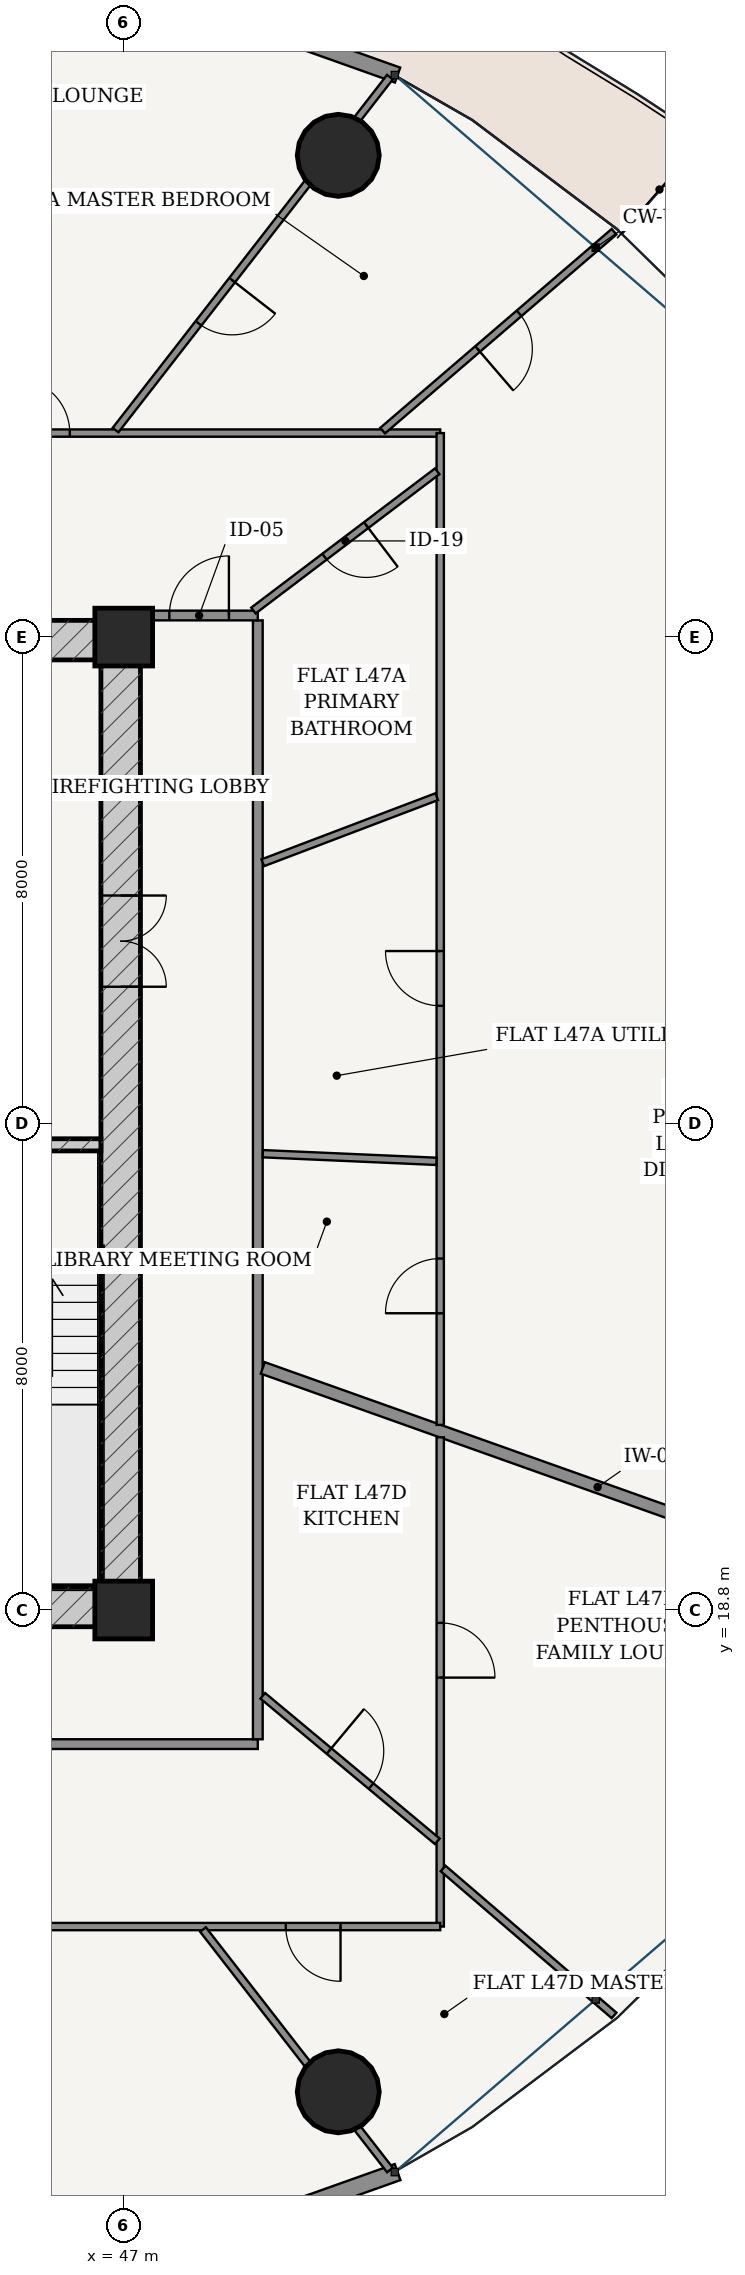
"""IFC4 building model, lengths in metres.
Left out: names, types, materials, properties, quantities, classifications, styles, units other than length and angle.
Written with IfcOpenShell. Run it as: python <this file> out.ifc"""

import sys

from ifc_helpers import new_model, si_unit, direction, frame, frame_2d, origin, origin_2d, place, context, subcontext, project, spatial, rectangle, hollow_circle, extrude, source, transform, mapped, element, fill, save


model = new_model("IFC4")
c1 = context("Model", 3, precision=1e-05, world=origin(), true_north=direction((-0.2419218956, 0.970295726276)))
c2 = subcontext(c1, "Body", "Model", "MODEL_VIEW")
j1 = project(units=[si_unit("LENGTHUNIT", "METRE"), si_unit("PLANEANGLEUNIT", "RADIAN")], contexts=[c1])
p1 = place(None, origin())
s1 = spatial("IfcSite", under=j1, at=p1, CompositionType="ELEMENT")
p2 = place(p1, origin())
s2 = spatial("IfcBuilding", under=s1, at=p2, CompositionType="ELEMENT")
p3 = place(p2, frame((0.0, 0.0, 178.6)))
s3 = spatial("IfcBuildingStorey", under=s2, at=p3, CompositionType="ELEMENT", Elevation=178.6)
for number, where, z_axis, x_axis in (
    (1, (47.0, 18.8, 0.0), (0.0, 0.0, 1.0), (1.0, 0.0, 0.0)),
    (2, (47.0, 34.8, 0.0), (0.0, 0.0, 1.0), (1.0, 0.0, 0.0)),
):
    element("IfcColumn", number, at=place(p3, frame(where, z_axis=z_axis, x_axis=x_axis)), inside=s3, PredefinedType="COLUMN", context=c2, shape_type="SweptSolid", body=[
        extrude(rectangle(XDim=0.95, YDim=0.95, at=origin_2d()), origin(), (0.0, 0.0, 1.0), 3.6),
    ])
p4 = place(p3, frame((28.725, 18.85, 0.0), z_axis=(0.0, 0.0, 1.0), x_axis=(1.0, 0.0, 0.0)))
e3 = element("IfcWall", 3, at=p4, inside=s3, PredefinedType="SHEAR", context=c2, shape_type="SweptSolid", body=[
    extrude(rectangle(XDim=18.55, YDim=0.65, at=frame_2d((9.275, 0.0))), origin(), (0.0, 0.0, 1.0), 3.33),
])
p5 = place(p4, frame((7.51, 0.0, 0.0)))
e4 = element("IfcOpeningElement", 4, at=p5, cuts=e3, PredefinedType="OPENING", context=c2, shape_type="SweptSolid", body=[
    extrude(rectangle(XDim=0.85, YDim=2.1, at=frame_2d((0.425, 1.05))), frame((0.0, 0.335, 0.0), z_axis=(0.0, -1.0, 0.0), x_axis=(1.0, 0.0, 0.0)), (0.0, 0.0, 1.0), 0.67),
])
p6 = place(p4, frame((10.59, 0.0, 0.0)))
e5 = element("IfcOpeningElement", 5, at=p6, cuts=e3, PredefinedType="OPENING", context=c2, shape_type="SweptSolid", body=[
    extrude(rectangle(XDim=0.85, YDim=2.1, at=frame_2d((0.425, 1.05))), frame((0.0, 0.335, 0.0), z_axis=(0.0, -1.0, 0.0), x_axis=(1.0, 0.0, 0.0)), (0.0, 0.0, 1.0), 0.67),
])
p7 = place(p3, frame((28.725, 34.75, 0.0), z_axis=(0.0, 0.0, 1.0), x_axis=(1.0, 0.0, 0.0)))
e6 = element("IfcWall", 6, at=p7, inside=s3, PredefinedType="SHEAR", context=c2, shape_type="SweptSolid", body=[
    extrude(rectangle(XDim=18.55, YDim=0.65, at=frame_2d((9.275, 0.0))), origin(), (0.0, 0.0, 1.0), 3.33),
])
p8 = place(p3, frame((46.95, 19.175, 0.0), z_axis=(0.0, 0.0, 1.0), x_axis=(0.0, 1.0, 0.0)))
e7 = element("IfcWall", 7, at=p8, inside=s3, PredefinedType="SHEAR", context=c2, shape_type="SweptSolid", body=[
    extrude(rectangle(XDim=15.25, YDim=0.65, at=frame_2d((7.625, 0.0))), origin(), (0.0, 0.0, 1.0), 3.33),
])
p9 = place(p8, frame((9.875, 0.0, 0.0)))
e8 = element("IfcOpeningElement", 8, at=p9, cuts=e7, PredefinedType="OPENING", context=c2, shape_type="SweptSolid", body=[
    extrude(rectangle(XDim=1.5, YDim=2.2, at=frame_2d((0.75, 1.1))), frame((0.0, 0.335, 0.0), z_axis=(0.0, -1.0, 0.0), x_axis=(1.0, 0.0, 0.0)), (0.0, 0.0, 1.0), 0.67),
])
p10 = place(p3, frame((43.305, 26.45, 0.0), z_axis=(0.0, 0.0, 1.0), x_axis=(1.0, 0.0, 0.0)))
e9 = element("IfcWall", 9, at=p10, inside=s3, PredefinedType="SOLIDWALL", context=c2, shape_type="SweptSolid", body=[
    extrude(rectangle(XDim=3.32, YDim=0.2, at=frame_2d((1.66, 0.0))), origin(), (0.0, 0.0, 1.0), 3.33),
])
p11 = place(p10, frame((1.185, 0.0, 0.0)))
e10 = element("IfcOpeningElement", 10, at=p11, cuts=e9, PredefinedType="OPENING", context=c2, shape_type="SweptSolid", body=[
    extrude(rectangle(XDim=0.95, YDim=2.15, at=frame_2d((0.475, 1.075))), frame((0.0, 0.11, 0.0), z_axis=(0.0, -1.0, 0.0), x_axis=(1.0, 0.0, 0.0)), (0.0, 0.0, 1.0), 0.22),
])
for number, where, z_axis, x_axis in (
    (11, (50.528, 42.723, 0.0), (0.0, 0.0, 1.0), (1.0, 0.0, 0.0)),
    (12, (50.528, 10.877, 0.0), (0.0, 0.0, 1.0), (1.0, 0.0, 0.0)),
):
    element("IfcColumn", number, at=place(p3, frame(where, z_axis=z_axis, x_axis=x_axis)), inside=s3, PredefinedType="COLUMN", context=c2, shape_type="SweptSolid", body=[
        extrude(hollow_circle(Radius=0.675, WallThickness=0.042, at=origin_2d()), origin(), (0.0, 0.0, 1.0), 3.6),
    ])
p12 = place(p3, frame((51.503, 44.043, 0.0), z_axis=(0.0, 0.0, 1.0), x_axis=(-0.942095406405, 0.335344964522, 0.0)))
e13 = element("IfcWall", 13, at=p12, inside=s3, PredefinedType="SOLIDWALL", context=c2, shape_type="SweptSolid", body=[
    extrude(rectangle(XDim=9.408, YDim=0.26, at=frame_2d((4.704, 0.0))), origin(), (0.0, 0.0, 1.0), 3.33),
])
p13 = place(p12, frame((4.029, 0.0, 0.0)))
e14 = element("IfcOpeningElement", 14, at=p13, cuts=e13, PredefinedType="OPENING", context=c2, shape_type="SweptSolid", body=[
    extrude(rectangle(XDim=1.35, YDim=2.2, at=frame_2d((0.675, 1.1))), frame((0.0, 0.14, 0.0), z_axis=(0.0, -1.0, 0.0), x_axis=(1.0, 0.0, 0.0)), (0.0, 0.0, 1.0), 0.28),
])
p14 = place(p3, frame((42.64, 6.402, 0.0), z_axis=(0.0, 0.0, 1.0), x_axis=(0.942103604331, 0.335321932934, 0.0)))
e15 = element("IfcWall", 15, at=p14, inside=s3, PredefinedType="SOLIDWALL", context=c2, shape_type="SweptSolid", body=[
    extrude(rectangle(XDim=9.408, YDim=0.28, at=frame_2d((4.704, 0.0))), origin(), (0.0, 0.0, 1.0), 3.33),
])
p15 = place(p14, frame((1.49, 0.0, 0.85)))
e16 = element("IfcOpeningElement", 16, at=p15, cuts=e15, PredefinedType="OPENING", context=c2, shape_type="SweptSolid", body=[
    extrude(rectangle(XDim=2.1, YDim=1.95, at=frame_2d((1.05, 0.975))), frame((0.0, 0.15, 0.0), z_axis=(0.0, -1.0, 0.0), x_axis=(1.0, 0.0, 0.0)), (0.0, 0.0, 1.0), 0.3),
])
p16 = place(p14, frame((5.818, 0.0, 0.85)))
e17 = element("IfcOpeningElement", 17, at=p16, cuts=e15, PredefinedType="OPENING", context=c2, shape_type="SweptSolid", body=[
    extrude(rectangle(XDim=2.1, YDim=1.95, at=frame_2d((1.05, 0.975))), frame((0.0, 0.15, 0.0), z_axis=(0.0, -1.0, 0.0), x_axis=(1.0, 0.0, 0.0)), (0.0, 0.0, 1.0), 0.3),
])
p17 = place(p3, frame((34.32, 16.595, 0.0), z_axis=(0.0, 0.0, 1.0), x_axis=(1.0, 0.0, 0.0)))
e18 = element("IfcWall", 18, at=p17, inside=s3, PredefinedType="PARTITIONING", context=c2, shape_type="SweptSolid", body=[
    extrude(rectangle(XDim=14.885, YDim=0.16, at=frame_2d((7.442, 0.0))), origin(), (0.0, 0.0, 1.0), 2.776),
])
p18 = place(p17, frame((10.026, 0.0, 0.0)))
e19 = element("IfcOpeningElement", 19, at=p18, cuts=e18, PredefinedType="OPENING", context=c2, shape_type="SweptSolid", body=[
    extrude(rectangle(XDim=0.98, YDim=2.2, at=frame_2d((0.49, 1.1))), frame((0.0, 0.09, 0.0), z_axis=(0.0, -1.0, 0.0), x_axis=(1.0, 0.0, 0.0)), (0.0, 0.0, 1.0), 0.18),
])
p19 = place(p3, frame((49.205, 16.675, 0.0), z_axis=(0.0, 0.0, 1.0), x_axis=(0.0, 1.0, 0.0)))
e20 = element("IfcWall", 20, at=p19, inside=s3, PredefinedType="PARTITIONING", context=c2, shape_type="SweptSolid", body=[
    extrude(rectangle(XDim=18.4, YDim=0.16, at=frame_2d((9.2, 0.0))), origin(), (0.0, 0.0, 1.0), 2.776),
])
p20 = place(p3, frame((47.275, 35.155, 0.0), z_axis=(0.0, 0.0, 1.0), x_axis=(1.0, 0.0, 0.0)))
e21 = element("IfcWall", 21, at=p20, inside=s3, PredefinedType="PARTITIONING", context=c2, shape_type="SweptSolid", body=[
    extrude(rectangle(XDim=1.93, YDim=0.16, at=frame_2d((0.965, 0.0))), origin(), (0.0, 0.0, 1.0), 2.776),
])
p21 = place(p20, frame((0.475, 0.0, 0.0)))
e22 = element("IfcOpeningElement", 22, at=p21, cuts=e21, PredefinedType="OPENING", context=c2, shape_type="SweptSolid", body=[
    extrude(rectangle(XDim=0.98, YDim=2.2, at=frame_2d((0.49, 1.1))), frame((0.0, 0.09, 0.0), z_axis=(0.0, -1.0, 0.0), x_axis=(1.0, 0.0, 0.0)), (0.0, 0.0, 1.0), 0.18),
])
p22 = place(p3, frame((49.287, 22.782, 0.0), z_axis=(0.0, 0.0, 1.0), x_axis=(0.942076460895, -0.335398183996, 0.0)))
e23 = element("IfcWall", 23, at=p22, inside=s3, PredefinedType="PARTITIONING", context=c2, shape_type="SweptSolid", body=[
    extrude(rectangle(XDim=11.689, YDim=0.2, at=frame_2d((5.845, 0.0))), origin(), (0.0, 0.0, 1.0), 2.846),
])
p23 = place(p3, frame((44.195, 38.155, 0.0), z_axis=(0.0, 0.0, 1.0), x_axis=(1.0, 0.0, 0.0)))
e24 = element("IfcWall", 24, at=p23, inside=s3, PredefinedType="PARTITIONING", context=c2, shape_type="SweptSolid", body=[
    extrude(rectangle(XDim=8.01, YDim=0.12, at=frame_2d((4.005, 0.0))), origin(), (0.0, 0.0, 1.0), 2.776),
])
p24 = place(p23, frame((1.018, 0.0, 0.0)))
e25 = element("IfcOpeningElement", 25, at=p24, cuts=e24, PredefinedType="OPENING", context=c2, shape_type="SweptSolid", body=[
    extrude(rectangle(XDim=0.9, YDim=2.15, at=frame_2d((0.45, 1.075))), frame((0.0, 0.07, 0.0), z_axis=(0.0, -1.0, 0.0), x_axis=(1.0, 0.0, 0.0)), (0.0, 0.0, 1.0), 0.14),
])
p25 = place(p3, frame((52.205, 38.155, 0.0), z_axis=(0.0, 0.0, 1.0), x_axis=(0.0, -1.0, 0.0)))
e26 = element("IfcWall", 26, at=p25, inside=s3, PredefinedType="PARTITIONING", context=c2, shape_type="SweptSolid", body=[
    extrude(rectangle(XDim=16.31, YDim=0.12, at=frame_2d((8.155, 0.0))), origin(), (0.0, 0.0, 1.0), 2.776),
])
p26 = place(p25, frame((13.574, 0.0, 0.0)))
e27 = element("IfcOpeningElement", 27, at=p26, cuts=e26, PredefinedType="OPENING", context=c2, shape_type="SweptSolid", body=[
    extrude(rectangle(XDim=0.9, YDim=2.15, at=frame_2d((0.45, 1.075))), frame((0.0, 0.07, 0.0), z_axis=(0.0, -1.0, 0.0), x_axis=(1.0, 0.0, 0.0)), (0.0, 0.0, 1.0), 0.14),
])
p27 = place(p25, frame((8.518, 0.0, 0.0)))
e28 = element("IfcOpeningElement", 28, at=p27, cuts=e26, PredefinedType="OPENING", context=c2, shape_type="SweptSolid", body=[
    extrude(rectangle(XDim=0.9, YDim=2.15, at=frame_2d((0.45, 1.075))), frame((0.0, 0.07, 0.0), z_axis=(0.0, -1.0, 0.0), x_axis=(1.0, 0.0, 0.0)), (0.0, 0.0, 1.0), 0.14),
])
p28 = place(p3, frame((51.258, 38.195, 0.0), z_axis=(0.0, 0.0, 1.0), x_axis=(0.758369880373, 0.651824458381, 0.0)))
e29 = element("IfcWall", 29, at=p28, inside=s3, PredefinedType="PARTITIONING", context=c2, shape_type="SweptSolid", body=[
    extrude(rectangle(XDim=5.018, YDim=0.12, at=frame_2d((2.509, 0.0))), origin(), (0.0, 0.0, 1.0), 2.846),
])
p29 = place(p28, frame((2.059, 0.0, 0.0)))
e30 = element("IfcOpeningElement", 30, at=p29, cuts=e29, PredefinedType="OPENING", context=c2, shape_type="SweptSolid", body=[
    extrude(rectangle(XDim=0.9, YDim=2.15, at=frame_2d((0.45, 1.075))), frame((0.0, 0.07, 0.0), z_axis=(0.0, -1.0, 0.0), x_axis=(1.0, 0.0, 0.0)), (0.0, 0.0, 1.0), 0.14),
])
p30 = place(p3, frame((46.865, 38.204, 0.0), z_axis=(0.0, 0.0, 1.0), x_axis=(0.613754405153, 0.789497010859, 0.0)))
e31 = element("IfcWall", 31, at=p30, inside=s3, PredefinedType="PARTITIONING", context=c2, shape_type="SweptSolid", body=[
    extrude(rectangle(XDim=7.353, YDim=0.12, at=frame_2d((3.677, 0.0))), origin(), (0.0, 0.0, 1.0), 2.776),
])
p31 = place(p30, frame((2.224, 0.0, 0.0)))
e32 = element("IfcOpeningElement", 32, at=p31, cuts=e31, PredefinedType="OPENING", context=c2, shape_type="SweptSolid", body=[
    extrude(rectangle(XDim=0.9, YDim=2.15, at=frame_2d((0.45, 1.075))), frame((0.0, 0.07, 0.0), z_axis=(0.0, -1.0, 0.0), x_axis=(1.0, 0.0, 0.0)), (0.0, 0.0, 1.0), 0.14),
])
p32 = place(p3, frame((49.287, 26.304, 0.0), z_axis=(0.0, 0.0, 1.0), x_axis=(0.999039813392, -0.043811542509, 0.0)))
e33 = element("IfcWall", 33, at=p32, inside=s3, PredefinedType="PARTITIONING", context=c2, shape_type="SweptSolid", body=[
    extrude(rectangle(XDim=2.859, YDim=0.12, at=frame_2d((1.429, 0.0))), origin(), (0.0, 0.0, 1.0), 3.33),
])
p33 = place(p3, frame((49.287, 31.089, 0.0), z_axis=(0.0, 0.0, 1.0), x_axis=(0.934802126635, 0.3551689514, 0.0)))
e34 = element("IfcWall", 34, at=p33, inside=s3, PredefinedType="PARTITIONING", context=c2, shape_type="SweptSolid", body=[
    extrude(rectangle(XDim=3.06, YDim=0.12, at=frame_2d((1.53, 0.0))), origin(), (0.0, 0.0, 1.0), 3.33),
])
p34 = place(p3, frame((49.133, 35.236, 0.0), z_axis=(0.0, 0.0, 1.0), x_axis=(0.797054583929, 0.603907269568, 0.0)))
e35 = element("IfcWall", 35, at=p34, inside=s3, PredefinedType="PARTITIONING", context=c2, shape_type="SweptSolid", body=[
    extrude(rectangle(XDim=3.792, YDim=0.12, at=frame_2d((1.896, 0.0))), origin(), (0.0, 0.0, 1.0), 3.005),
])
p35 = place(p34, frame((1.466, 0.0, 0.0)))
e36 = element("IfcOpeningElement", 36, at=p35, cuts=e35, PredefinedType="OPENING", context=c2, shape_type="SweptSolid", body=[
    extrude(rectangle(XDim=0.86, YDim=2.15, at=frame_2d((0.43, 1.075))), frame((0.0, 0.07, 0.0), z_axis=(0.0, -1.0, 0.0), x_axis=(1.0, 0.0, 0.0)), (0.0, 0.0, 1.0), 0.14),
])
p36 = place(p3, frame((52.205, 21.641, 0.0), z_axis=(0.0, 0.0, 1.0), x_axis=(0.0, -1.0, 0.0)))
e37 = element("IfcWall", 37, at=p36, inside=s3, PredefinedType="PARTITIONING", context=c2, shape_type="SweptSolid", body=[
    extrude(rectangle(XDim=8.046, YDim=0.12, at=frame_2d((4.023, 0.0))), origin(), (0.0, 0.0, 1.0), 2.776),
])
p37 = place(p36, frame((3.052, 0.0, 0.0)))
e38 = element("IfcOpeningElement", 38, at=p37, cuts=e37, PredefinedType="OPENING", context=c2, shape_type="SweptSolid", body=[
    extrude(rectangle(XDim=0.9, YDim=2.15, at=frame_2d((0.45, 1.075))), frame((0.0, 0.07, 0.0), z_axis=(0.0, -1.0, 0.0), x_axis=(1.0, 0.0, 0.0)), (0.0, 0.0, 1.0), 0.14),
])
p38 = place(p3, frame((52.205, 13.595, 0.0), z_axis=(0.0, 0.0, 1.0), x_axis=(-1.0, 0.0, 0.0)))
e39 = element("IfcWall", 39, at=p38, inside=s3, PredefinedType="PARTITIONING", context=c2, shape_type="SweptSolid", body=[
    extrude(rectangle(XDim=17.159, YDim=0.12, at=frame_2d((8.58, 0.0))), origin(), (0.0, 0.0, 1.0), 2.776),
])
p39 = place(p38, frame((6.879, 0.0, 0.0)))
e40 = element("IfcOpeningElement", 40, at=p39, cuts=e39, PredefinedType="OPENING", context=c2, shape_type="SweptSolid", body=[
    extrude(rectangle(XDim=0.9, YDim=2.15, at=frame_2d((0.45, 1.075))), frame((0.0, 0.07, 0.0), z_axis=(0.0, -1.0, 0.0), x_axis=(1.0, 0.0, 0.0)), (0.0, 0.0, 1.0), 0.14),
])
p40 = place(p38, frame((1.64, 0.0, 0.0)))
e41 = element("IfcOpeningElement", 41, at=p40, cuts=e39, PredefinedType="OPENING", context=c2, shape_type="SweptSolid", body=[
    extrude(rectangle(XDim=0.9, YDim=2.15, at=frame_2d((0.45, 1.075))), frame((0.0, 0.07, 0.0), z_axis=(0.0, -1.0, 0.0), x_axis=(1.0, 0.0, 0.0)), (0.0, 0.0, 1.0), 0.14),
])
p41 = place(p3, frame((48.304, 13.546, 0.0), z_axis=(0.0, 0.0, 1.0), x_axis=(0.613734792328, -0.789512257464, 0.0)))
e42 = element("IfcWall", 42, at=p41, inside=s3, PredefinedType="PARTITIONING", context=c2, shape_type="SweptSolid", body=[
    extrude(rectangle(XDim=5.01, YDim=0.12, at=frame_2d((2.505, 0.0))), origin(), (0.0, 0.0, 1.0), 2.776),
])
p42 = place(p3, frame((52.252, 14.55, 0.0), z_axis=(0.0, 0.0, 1.0), x_axis=(0.758368113794, -0.651826513714, 0.0)))
e43 = element("IfcWall", 43, at=p42, inside=s3, PredefinedType="PARTITIONING", context=c2, shape_type="SweptSolid", body=[
    extrude(rectangle(XDim=3.708, YDim=0.12, at=frame_2d((1.854, 0.0))), origin(), (0.0, 0.0, 1.0), 2.846),
])
p43 = place(p3, frame((49.287, 17.39, 0.0), z_axis=(0.0, 0.0, 1.0), x_axis=(0.768065994597, -0.640370695725, 0.0)))
e44 = element("IfcWall", 44, at=p43, inside=s3, PredefinedType="PARTITIONING", context=c2, shape_type="SweptSolid", body=[
    extrude(rectangle(XDim=3.738, YDim=0.12, at=frame_2d((1.869, 0.0))), origin(), (0.0, 0.0, 1.0), 3.005),
])
p44 = place(p43, frame((1.419, 0.0, 0.0)))
e45 = element("IfcOpeningElement", 45, at=p44, cuts=e44, PredefinedType="OPENING", context=c2, shape_type="SweptSolid", body=[
    extrude(rectangle(XDim=0.9, YDim=2.15, at=frame_2d((0.45, 1.075))), frame((0.0, 0.07, 0.0), z_axis=(0.0, -1.0, 0.0), x_axis=(1.0, 0.0, 0.0)), (0.0, 0.0, 1.0), 0.14),
])
m1 = source(origin(), c2, "Body", "SweptSolid", [
    extrude(rectangle(XDim=1.5, YDim=2.2, at=frame_2d((0.75, 1.1))), frame((0.0, 0.025, 0.0), z_axis=(0.0, -1.0, 0.0), x_axis=(1.0, 0.0, 0.0)), (0.0, 0.0, 1.0), 0.05),
])
p45 = place(p9, frame((1.5, 0.0, 0.0), z_axis=(0.0, 0.0, 1.0), x_axis=(-1.0, 0.0, 0.0)))
e46 = element("IfcDoor", 46, at=p45, inside=s3, OperationType="DOUBLE_DOOR_SINGLE_SWING", PredefinedType="DOOR", context=c2, shape_type="MappedRepresentation", body=[
    mapped(m1, transform((0.0, 0.0, 0.0), scale=1.0)),
])
fill(e8, e46)
m2 = source(origin(), c2, "Body", "SweptSolid", [
    extrude(rectangle(XDim=0.98, YDim=2.2, at=frame_2d((0.49, 1.1))), frame((0.0, 0.025, 0.0), z_axis=(0.0, -1.0, 0.0), x_axis=(1.0, 0.0, 0.0)), (0.0, 0.0, 1.0), 0.05),
])
p46 = place(p21, origin())
e47 = element("IfcDoor", 47, at=p46, inside=s3, OperationType="SINGLE_SWING_RIGHT", PredefinedType="DOOR", context=c2, shape_type="MappedRepresentation", body=[
    mapped(m2, transform((0.0, 0.0, 0.0), scale=1.0)),
])
fill(e22, e47)
m3 = source(origin(), c2, "Body", "SweptSolid", [
    extrude(rectangle(XDim=0.86, YDim=2.15, at=frame_2d((0.43, 1.075))), frame((0.0, 0.025, 0.0), z_axis=(0.0, -1.0, 0.0), x_axis=(1.0, 0.0, 0.0)), (0.0, 0.0, 1.0), 0.05),
])
p47 = place(p35, frame((0.86, 0.0, 0.0), z_axis=(0.0, 0.0, 1.0), x_axis=(-1.0, 0.0, 0.0)))
e48 = element("IfcDoor", 48, at=p47, inside=s3, OperationType="SINGLE_SWING_LEFT", PredefinedType="DOOR", context=c2, shape_type="MappedRepresentation", body=[
    mapped(m3, transform((0.0, 0.0, 0.0), scale=1.0)),
])
fill(e36, e48)
m4 = source(origin(), c2, "Body", "SweptSolid", [
    extrude(rectangle(XDim=0.9, YDim=2.15, at=frame_2d((0.45, 1.075))), frame((0.0, 0.025, 0.0), z_axis=(0.0, -1.0, 0.0), x_axis=(1.0, 0.0, 0.0)), (0.0, 0.0, 1.0), 0.05),
])
p48 = place(p24, origin())
e49 = element("IfcDoor", 49, at=p48, inside=s3, OperationType="SINGLE_SWING_LEFT", PredefinedType="DOOR", context=c2, shape_type="MappedRepresentation", body=[
    mapped(m4, transform((0.0, 0.0, 0.0), scale=1.0)),
])
fill(e25, e49)
p49 = place(p31, frame((0.9, 0.0, 0.0), z_axis=(0.0, 0.0, 1.0), x_axis=(-1.0, 0.0, 0.0)))
e50 = element("IfcDoor", 50, at=p49, inside=s3, OperationType="SINGLE_SWING_LEFT", PredefinedType="DOOR", context=c2, shape_type="MappedRepresentation", body=[
    mapped(m4, transform((0.0, 0.0, 0.0), scale=1.0)),
])
fill(e32, e50)
p50 = place(p29, frame((0.9, 0.0, 0.0), z_axis=(0.0, 0.0, 1.0), x_axis=(-1.0, 0.0, 0.0)))
e51 = element("IfcDoor", 51, at=p50, inside=s3, OperationType="SINGLE_SWING_RIGHT", PredefinedType="DOOR", context=c2, shape_type="MappedRepresentation", body=[
    mapped(m4, transform((0.0, 0.0, 0.0), scale=1.0)),
])
fill(e30, e51)
p51 = place(p26, frame((0.9, 0.0, 0.0), z_axis=(0.0, 0.0, 1.0), x_axis=(-1.0, 0.0, 0.0)))
e52 = element("IfcDoor", 52, at=p51, inside=s3, OperationType="SINGLE_SWING_LEFT", PredefinedType="DOOR", context=c2, shape_type="MappedRepresentation", body=[
    mapped(m4, transform((0.0, 0.0, 0.0), scale=1.0)),
])
fill(e27, e52)
p52 = place(p27, frame((0.9, 0.0, 0.0), z_axis=(0.0, 0.0, 1.0), x_axis=(-1.0, 0.0, 0.0)))
e53 = element("IfcDoor", 53, at=p52, inside=s3, OperationType="SINGLE_SWING_RIGHT", PredefinedType="DOOR", context=c2, shape_type="MappedRepresentation", body=[
    mapped(m4, transform((0.0, 0.0, 0.0), scale=1.0)),
])
fill(e28, e53)
p53 = place(p44, origin())
e54 = element("IfcDoor", 54, at=p53, inside=s3, OperationType="SINGLE_SWING_LEFT", PredefinedType="DOOR", context=c2, shape_type="MappedRepresentation", body=[
    mapped(m4, transform((0.0, 0.0, 0.0), scale=1.0)),
])
fill(e45, e54)
p54 = place(p37, origin())
e55 = element("IfcDoor", 55, at=p54, inside=s3, OperationType="SINGLE_SWING_RIGHT", PredefinedType="DOOR", context=c2, shape_type="MappedRepresentation", body=[
    mapped(m4, transform((0.0, 0.0, 0.0), scale=1.0)),
])
fill(e38, e55)
p55 = place(p40, origin())
e56 = element("IfcDoor", 56, at=p55, inside=s3, OperationType="SINGLE_SWING_LEFT", PredefinedType="DOOR", context=c2, shape_type="MappedRepresentation", body=[
    mapped(m4, transform((0.0, 0.0, 0.0), scale=1.0)),
])
fill(e41, e56)
save(model, sys.argv[1])
